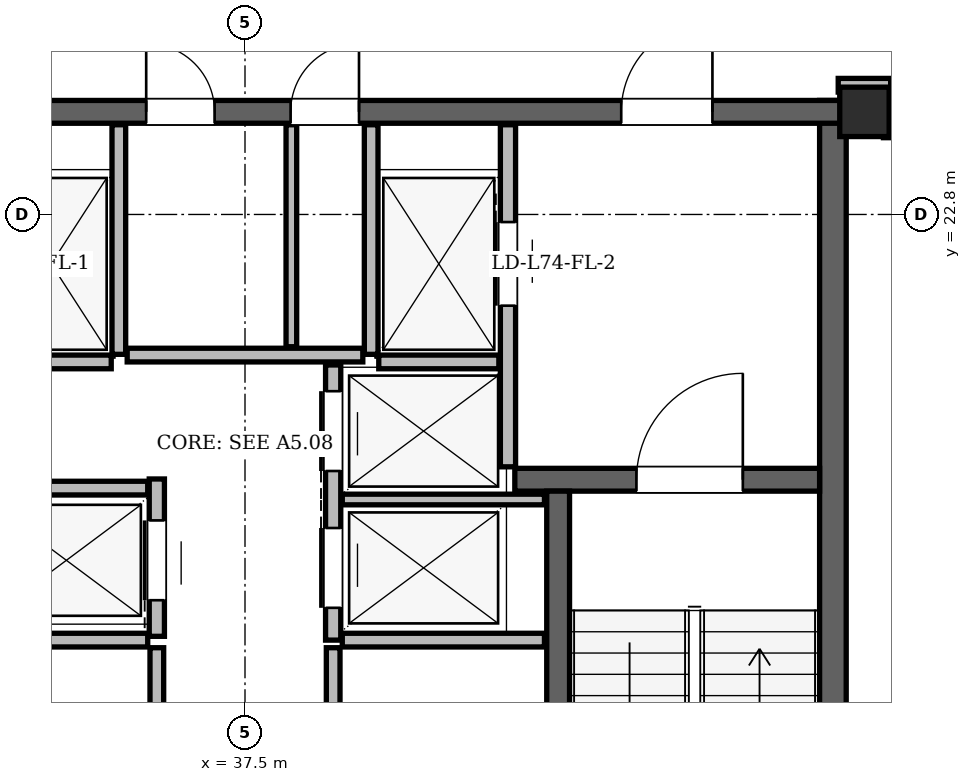
"""IFC4 building model, lengths in metres.
Left out: names, types, materials, properties, quantities, classifications, styles, units other than length and angle.
Written with IfcOpenShell. Run it as: python <this file> out.ifc"""

import sys

from ifc_helpers import new_model, si_unit, direction, frame, frame_2d, origin, origin_2d, place, context, subcontext, project, spatial, rectangle, hollow_rectangle, extrude, element, fill, save


model = new_model("IFC4")
c1 = context("Model", 3, precision=1e-05, world=origin(), true_north=direction((0.0, 1.0)))
c2 = subcontext(c1, "Body", "Model", "MODEL_VIEW")
j1 = project(units=[si_unit("LENGTHUNIT", "METRE"), si_unit("PLANEANGLEUNIT", "RADIAN")], contexts=[c1])
p1 = place(None, origin())
s1 = spatial("IfcSite", under=j1, at=p1, CompositionType="ELEMENT")
p2 = place(p1, origin())
s2 = spatial("IfcBuilding", under=s1, at=p2, CompositionType="ELEMENT")
p3 = place(p2, frame((0.0, 0.0, 281.1)))
s3 = spatial("IfcBuildingStorey", under=s2, at=p3, CompositionType="ELEMENT", Elevation=281.1)
p4 = place(p3, frame((45.65, 24.15, 0.0), z_axis=(0.0, 0.0, 1.0), x_axis=(1.0, 0.0, 0.0)))
e1 = element("IfcColumn", 1, at=p4, inside=s3, PredefinedType="COLUMN", context=c2, shape_type="SweptSolid", body=[
    extrude(hollow_rectangle(XDim=0.65, YDim=0.65, WallThickness=0.05, at=origin_2d()), origin(), (0.0, 0.0, 1.0), 3.9),
])
p5 = place(p3, frame((45.235, 11.0, 0.0), z_axis=(0.0, 0.0, 1.0), x_axis=(0.0, 1.0, 0.0)))
e2 = element("IfcWall", 2, at=p5, inside=s3, PredefinedType="SHEAR", context=c2, shape_type="SweptSolid", body=[
    extrude(rectangle(XDim=13.3, YDim=0.35, at=frame_2d((6.65, 0.0))), origin(), (0.0, 0.0, 1.0), 3.68),
])
p6 = place(p3, frame((29.65, 24.15, 0.0), z_axis=(0.0, 0.0, 1.0), x_axis=(1.0, 0.0, 0.0)))
e3 = element("IfcWall", 3, at=p6, inside=s3, PredefinedType="SHEAR", context=c2, shape_type="SweptSolid", body=[
    extrude(rectangle(XDim=15.7, YDim=0.3, at=frame_2d((7.85, 0.0))), origin(), (0.0, 0.0, 1.0), 3.68),
])
p7 = place(p6, frame((1.7, 0.0, 0.0)))
e4 = element("IfcOpeningElement", 4, at=p7, cuts=e3, PredefinedType="OPENING", context=c2, shape_type="SweptSolid", body=[
    extrude(rectangle(XDim=1.2, YDim=2.2, at=frame_2d((0.6, 1.1))), frame((0.0, 0.15, 0.0), z_axis=(0.0, -1.0, 0.0), x_axis=(1.0, 0.0, 0.0)), (0.0, 0.0, 1.0), 0.3),
])
p8 = place(p6, frame((12.8, 0.0, 0.0)))
e5 = element("IfcOpeningElement", 5, at=p8, cuts=e3, PredefinedType="OPENING", context=c2, shape_type="SweptSolid", body=[
    extrude(rectangle(XDim=1.2, YDim=2.2, at=frame_2d((0.6, 1.1))), frame((0.0, 0.15, 0.0), z_axis=(0.0, -1.0, 0.0), x_axis=(1.0, 0.0, 0.0)), (0.0, 0.0, 1.0), 0.3),
])
p9 = place(p6, frame((6.55, 0.0, 0.0)))
e6 = element("IfcOpeningElement", 6, at=p9, cuts=e3, PredefinedType="OPENING", context=c2, shape_type="SweptSolid", body=[
    extrude(rectangle(XDim=0.9, YDim=2.05, at=frame_2d((0.45, 1.025))), frame((0.0, 0.15, 0.0), z_axis=(0.0, -1.0, 0.0), x_axis=(1.0, 0.0, 0.0)), (0.0, 0.0, 1.0), 0.3),
])
p10 = place(p6, frame((8.45, 0.0, 0.0)))
e7 = element("IfcOpeningElement", 7, at=p10, cuts=e3, PredefinedType="OPENING", context=c2, shape_type="SweptSolid", body=[
    extrude(rectangle(XDim=0.9, YDim=2.05, at=frame_2d((0.45, 1.025))), frame((0.0, 0.15, 0.0), z_axis=(0.0, -1.0, 0.0), x_axis=(1.0, 0.0, 0.0)), (0.0, 0.0, 1.0), 0.3),
])
p11 = place(p3, frame((41.05, 19.31, 0.0), z_axis=(0.0, 0.0, 1.0), x_axis=(1.0, 0.0, 0.0)))
e8 = element("IfcWall", 8, at=p11, inside=s3, PredefinedType="SHEAR", context=c2, shape_type="SweptSolid", body=[
    extrude(rectangle(XDim=4.01, YDim=0.3, at=frame_2d((2.005, 0.0))), origin(), (0.0, 0.0, 1.0), 3.68),
])
p12 = place(p11, frame((1.6, 0.0, 0.0)))
e9 = element("IfcOpeningElement", 9, at=p12, cuts=e8, PredefinedType="OPENING", context=c2, shape_type="SweptSolid", body=[
    extrude(rectangle(XDim=1.4, YDim=2.2, at=frame_2d((0.7, 1.1))), frame((0.0, 0.15, 0.0), z_axis=(0.0, -1.0, 0.0), x_axis=(1.0, 0.0, 0.0)), (0.0, 0.0, 1.0), 0.3),
])
p13 = place(p3, frame((41.62, 11.54, 0.0), z_axis=(0.0, 0.0, 1.0), x_axis=(0.0, 1.0, 0.0)))
e10 = element("IfcWall", 10, at=p13, inside=s3, PredefinedType="SHEAR", context=c2, shape_type="SweptSolid", body=[
    extrude(rectangle(XDim=7.62, YDim=0.3, at=frame_2d((3.81, 0.0))), origin(), (0.0, 0.0, 1.0), 3.68),
])
p14 = place(p3, frame((58.454, 10.584, 0.0), z_axis=(0.0, 0.0, 1.0), x_axis=(-0.500002460556, 0.866023983177, 0.0)))
e11 = element("IfcWall", 11, at=p14, inside=s3, PredefinedType="SOLIDWALL", context=c2, shape_type="SweptSolid", body=[
    extrude(rectangle(XDim=37.435, YDim=0.29, at=frame_2d((18.718, 0.0))), origin(), (0.0, 0.0, 1.0), 3.058),
])
p15 = place(p14, frame((3.639, 0.0, 0.0)))
e12 = element("IfcOpeningElement", 12, at=p15, cuts=e11, PredefinedType="OPENING", context=c2, shape_type="SweptSolid", body=[
    extrude(rectangle(XDim=1.5, YDim=2.2, at=frame_2d((0.75, 1.1))), frame((0.0, 0.145, 0.0), z_axis=(0.0, -1.0, 0.0), x_axis=(1.0, 0.0, 0.0)), (0.0, 0.0, 1.0), 0.29),
])
p16 = place(p14, frame((27.901, 0.0, 0.0)))
e13 = element("IfcOpeningElement", 13, at=p16, cuts=e11, PredefinedType="OPENING", context=c2, shape_type="SweptSolid", body=[
    extrude(rectangle(XDim=1.5, YDim=2.2, at=frame_2d((0.75, 1.1))), frame((0.0, 0.145, 0.0), z_axis=(0.0, -1.0, 0.0), x_axis=(1.0, 0.0, 0.0)), (0.0, 0.0, 1.0), 0.29),
])
p17 = place(p14, frame((0.782, 0.0, 0.85)))
e14 = element("IfcOpeningElement", 14, at=p17, cuts=e11, PredefinedType="OPENING", context=c2, shape_type="SweptSolid", body=[
    extrude(rectangle(XDim=1.2, YDim=1.48, at=frame_2d((0.6, 0.74))), frame((0.0, 0.145, 0.0), z_axis=(0.0, -1.0, 0.0), x_axis=(1.0, 0.0, 0.0)), (0.0, 0.0, 1.0), 0.29),
])
p18 = place(p14, frame((7.149, 0.0, 0.85)))
e15 = element("IfcOpeningElement", 15, at=p18, cuts=e11, PredefinedType="OPENING", context=c2, shape_type="SweptSolid", body=[
    extrude(rectangle(XDim=2.4, YDim=1.9, at=frame_2d((1.2, 0.95))), frame((0.0, 0.145, 0.0), z_axis=(0.0, -1.0, 0.0), x_axis=(1.0, 0.0, 0.0)), (0.0, 0.0, 1.0), 0.29),
])
p19 = place(p14, frame((35.38, 0.0, 0.85)))
e16 = element("IfcOpeningElement", 16, at=p19, cuts=e11, PredefinedType="OPENING", context=c2, shape_type="SweptSolid", body=[
    extrude(rectangle(XDim=1.2, YDim=1.48, at=frame_2d((0.6, 0.74))), frame((0.0, 0.145, 0.0), z_axis=(0.0, -1.0, 0.0), x_axis=(1.0, 0.0, 0.0)), (0.0, 0.0, 1.0), 0.29),
])
p20 = place(p14, frame((16.994, 0.0, 0.85)))
e17 = element("IfcOpeningElement", 17, at=p20, cuts=e11, PredefinedType="OPENING", context=c2, shape_type="SweptSolid", body=[
    extrude(rectangle(XDim=1.2, YDim=1.48, at=frame_2d((0.6, 0.74))), frame((0.0, 0.145, 0.0), z_axis=(0.0, -1.0, 0.0), x_axis=(1.0, 0.0, 0.0)), (0.0, 0.0, 1.0), 0.29),
])
p21 = place(p14, frame((19.423, 0.0, 0.85)))
e18 = element("IfcOpeningElement", 18, at=p21, cuts=e11, PredefinedType="OPENING", context=c2, shape_type="SweptSolid", body=[
    extrude(rectangle(XDim=1.8, YDim=1.75, at=frame_2d((0.9, 0.875))), frame((0.0, 0.145, 0.0), z_axis=(0.0, -1.0, 0.0), x_axis=(1.0, 0.0, 0.0)), (0.0, 0.0, 1.0), 0.29),
])
p22 = place(p14, frame((22.626, 0.0, 0.85)))
e19 = element("IfcOpeningElement", 19, at=p22, cuts=e11, PredefinedType="OPENING", context=c2, shape_type="SweptSolid", body=[
    extrude(rectangle(XDim=2.2, YDim=1.85, at=frame_2d((1.1, 0.925))), frame((0.0, 0.145, 0.0), z_axis=(0.0, -1.0, 0.0), x_axis=(1.0, 0.0, 0.0)), (0.0, 0.0, 1.0), 0.29),
])
p23 = place(p14, frame((14.598, 0.0, 0.85)))
e20 = element("IfcOpeningElement", 20, at=p23, cuts=e11, PredefinedType="OPENING", context=c2, shape_type="SweptSolid", body=[
    extrude(rectangle(XDim=1.2, YDim=1.48, at=frame_2d((0.6, 0.74))), frame((0.0, 0.145, 0.0), z_axis=(0.0, -1.0, 0.0), x_axis=(1.0, 0.0, 0.0)), (0.0, 0.0, 1.0), 0.29),
])
p24 = place(p3, frame((35.264, 43.004, 0.0), z_axis=(0.0, 0.0, 1.0), x_axis=(-0.500002460556, -0.866023983177, 0.0)))
e21 = element("IfcWall", 21, at=p24, inside=s3, PredefinedType="SOLIDWALL", context=c2, shape_type="SweptSolid", body=[
    extrude(rectangle(XDim=37.435, YDim=0.29, at=frame_2d((18.718, 0.0))), origin(), (0.0, 0.0, 1.0), 3.058),
])
p25 = place(p24, frame((3.639, 0.0, 0.0)))
e22 = element("IfcOpeningElement", 22, at=p25, cuts=e21, PredefinedType="OPENING", context=c2, shape_type="SweptSolid", body=[
    extrude(rectangle(XDim=1.5, YDim=2.2, at=frame_2d((0.75, 1.1))), frame((0.0, 0.145, 0.0), z_axis=(0.0, -1.0, 0.0), x_axis=(1.0, 0.0, 0.0)), (0.0, 0.0, 1.0), 0.29),
])
p26 = place(p24, frame((27.481, 0.0, 0.0)))
e23 = element("IfcOpeningElement", 23, at=p26, cuts=e21, PredefinedType="OPENING", context=c2, shape_type="SweptSolid", body=[
    extrude(rectangle(XDim=1.5, YDim=2.2, at=frame_2d((0.75, 1.1))), frame((0.0, 0.145, 0.0), z_axis=(0.0, -1.0, 0.0), x_axis=(1.0, 0.0, 0.0)), (0.0, 0.0, 1.0), 0.29),
])
p27 = place(p24, frame((35.251, 0.0, 0.85)))
e24 = element("IfcOpeningElement", 24, at=p27, cuts=e21, PredefinedType="OPENING", context=c2, shape_type="SweptSolid", body=[
    extrude(rectangle(XDim=1.2, YDim=1.48, at=frame_2d((0.6, 0.74))), frame((0.0, 0.145, 0.0), z_axis=(0.0, -1.0, 0.0), x_axis=(1.0, 0.0, 0.0)), (0.0, 0.0, 1.0), 0.29),
])
p28 = place(p24, frame((29.441, 0.0, 0.85)))
e25 = element("IfcOpeningElement", 25, at=p28, cuts=e21, PredefinedType="OPENING", context=c2, shape_type="SweptSolid", body=[
    extrude(rectangle(XDim=1.2, YDim=1.48, at=frame_2d((0.6, 0.74))), frame((0.0, 0.145, 0.0), z_axis=(0.0, -1.0, 0.0), x_axis=(1.0, 0.0, 0.0)), (0.0, 0.0, 1.0), 0.29),
])
p29 = place(p24, frame((32.709, 0.0, 0.85)))
e26 = element("IfcOpeningElement", 26, at=p29, cuts=e21, PredefinedType="OPENING", context=c2, shape_type="SweptSolid", body=[
    extrude(rectangle(XDim=1.2, YDim=1.48, at=frame_2d((0.6, 0.74))), frame((0.0, 0.145, 0.0), z_axis=(0.0, -1.0, 0.0), x_axis=(1.0, 0.0, 0.0)), (0.0, 0.0, 1.0), 0.29),
])
p30 = place(p24, frame((20.345, 0.0, 0.85)))
e27 = element("IfcOpeningElement", 27, at=p30, cuts=e21, PredefinedType="OPENING", context=c2, shape_type="SweptSolid", body=[
    extrude(rectangle(XDim=1.2, YDim=1.48, at=frame_2d((0.6, 0.74))), frame((0.0, 0.145, 0.0), z_axis=(0.0, -1.0, 0.0), x_axis=(1.0, 0.0, 0.0)), (0.0, 0.0, 1.0), 0.29),
])
p31 = place(p24, frame((22.614, 0.0, 0.85)))
e28 = element("IfcOpeningElement", 28, at=p31, cuts=e21, PredefinedType="OPENING", context=c2, shape_type="SweptSolid", body=[
    extrude(rectangle(XDim=1.2, YDim=1.48, at=frame_2d((0.6, 0.74))), frame((0.0, 0.145, 0.0), z_axis=(0.0, -1.0, 0.0), x_axis=(1.0, 0.0, 0.0)), (0.0, 0.0, 1.0), 0.29),
])
p32 = place(p24, frame((1.862, 0.0, 0.85)))
e29 = element("IfcOpeningElement", 29, at=p32, cuts=e21, PredefinedType="OPENING", context=c2, shape_type="SweptSolid", body=[
    extrude(rectangle(XDim=1.2, YDim=1.48, at=frame_2d((0.6, 0.74))), frame((0.0, 0.145, 0.0), z_axis=(0.0, -1.0, 0.0), x_axis=(1.0, 0.0, 0.0)), (0.0, 0.0, 1.0), 0.29),
])
p33 = place(p24, frame((8.825, 0.0, 0.85)))
e30 = element("IfcOpeningElement", 30, at=p33, cuts=e21, PredefinedType="OPENING", context=c2, shape_type="SweptSolid", body=[
    extrude(rectangle(XDim=1.2, YDim=1.48, at=frame_2d((0.6, 0.74))), frame((0.0, 0.145, 0.0), z_axis=(0.0, -1.0, 0.0), x_axis=(1.0, 0.0, 0.0)), (0.0, 0.0, 1.0), 0.29),
])
p34 = place(p3, frame((35.84, 20.96, 0.0), z_axis=(0.0, 0.0, 1.0), x_axis=(0.0, 1.0, 0.0)))
e31 = element("IfcWall", 31, at=p34, inside=s3, PredefinedType="PARTITIONING", context=c2, shape_type="SweptSolid", body=[
    extrude(rectangle(XDim=3.02, YDim=0.18, at=frame_2d((1.51, 0.0))), origin(), (0.0, 0.0, 1.0), 3.68),
])
p35 = place(p3, frame((34.16, 20.86, 0.0), z_axis=(0.0, 0.0, 1.0), x_axis=(1.0, 0.0, 0.0)))
e32 = element("IfcWall", 32, at=p35, inside=s3, PredefinedType="PARTITIONING", context=c2, shape_type="SweptSolid", body=[
    extrude(rectangle(XDim=1.58, YDim=0.18, at=frame_2d((0.79, 0.0))), origin(), (0.0, 0.0, 1.0), 3.68),
])
p36 = place(p3, frame((40.96, 19.48, 0.0), z_axis=(0.0, 0.0, 1.0), x_axis=(0.0, 1.0, 0.0)))
e33 = element("IfcWall", 33, at=p36, inside=s3, PredefinedType="PARTITIONING", context=c2, shape_type="SweptSolid", body=[
    extrude(rectangle(XDim=4.5, YDim=0.2, at=frame_2d((2.25, 0.0))), origin(), (0.0, 0.0, 1.0), 3.68),
])
p37 = place(p36, frame((2.12, 0.0, 0.0)))
e34 = element("IfcOpeningElement", 34, at=p37, cuts=e33, PredefinedType="OPENING", context=c2, shape_type="SweptSolid", body=[
    extrude(rectangle(XDim=1.1, YDim=2.2, at=frame_2d((0.55, 1.1))), frame((0.0, 0.1, 0.0), z_axis=(0.0, -1.0, 0.0), x_axis=(1.0, 0.0, 0.0)), (0.0, 0.0, 1.0), 0.2),
])
p38 = place(p3, frame((39.16, 20.96, 0.0), z_axis=(0.0, 0.0, 1.0), x_axis=(0.0, 1.0, 0.0)))
e35 = element("IfcWall", 35, at=p38, inside=s3, PredefinedType="PARTITIONING", context=c2, shape_type="SweptSolid", body=[
    extrude(rectangle(XDim=3.02, YDim=0.18, at=frame_2d((1.51, 0.0))), origin(), (0.0, 0.0, 1.0), 3.68),
])
p39 = place(p3, frame((39.26, 20.86, 0.0), z_axis=(0.0, 0.0, 1.0), x_axis=(1.0, 0.0, 0.0)))
e36 = element("IfcWall", 36, at=p39, inside=s3, PredefinedType="PARTITIONING", context=c2, shape_type="SweptSolid", body=[
    extrude(rectangle(XDim=1.58, YDim=0.18, at=frame_2d((0.79, 0.0))), origin(), (0.0, 0.0, 1.0), 3.68),
])
p40 = place(p3, frame((36.34, 17.25, 0.0), z_axis=(0.0, 0.0, 1.0), x_axis=(0.0, 1.0, 0.0)))
e37 = element("IfcWall", 37, at=p40, inside=s3, PredefinedType="PARTITIONING", context=c2, shape_type="SweptSolid", body=[
    extrude(rectangle(XDim=2.07, YDim=0.2, at=frame_2d((1.035, 0.0))), origin(), (0.0, 0.0, 1.0), 3.68),
])
p41 = place(p40, frame((0.475, 0.0, 0.0)))
e38 = element("IfcOpeningElement", 38, at=p41, cuts=e37, PredefinedType="OPENING", context=c2, shape_type="SweptSolid", body=[
    extrude(rectangle(XDim=1.05, YDim=2.15, at=frame_2d((0.525, 1.075))), frame((0.0, 0.1, 0.0), z_axis=(0.0, -1.0, 0.0), x_axis=(1.0, 0.0, 0.0)), (0.0, 0.0, 1.0), 0.2),
])
p42 = place(p3, frame((33.95, 19.2, 0.0), z_axis=(0.0, 0.0, 1.0), x_axis=(1.0, 0.0, 0.0)))
e39 = element("IfcWall", 39, at=p42, inside=s3, PredefinedType="PARTITIONING", context=c2, shape_type="SweptSolid", body=[
    extrude(rectangle(XDim=2.27, YDim=0.18, at=frame_2d((1.135, 0.0))), origin(), (0.0, 0.0, 1.0), 3.68),
])
p43 = place(p3, frame((33.56, 17.2, 0.0), z_axis=(0.0, 0.0, 1.0), x_axis=(1.0, 0.0, 0.0)))
e40 = element("IfcWall", 40, at=p43, inside=s3, PredefinedType="PARTITIONING", context=c2, shape_type="SweptSolid", body=[
    extrude(rectangle(XDim=2.66, YDim=0.18, at=frame_2d((1.33, 0.0))), origin(), (0.0, 0.0, 1.0), 3.68),
])
p44 = place(p3, frame((36.34, 11.55, 0.0), z_axis=(0.0, 0.0, 1.0), x_axis=(0.0, 1.0, 0.0)))
e41 = element("IfcWall", 41, at=p44, inside=s3, PredefinedType="PARTITIONING", context=c2, shape_type="SweptSolid", body=[
    extrude(rectangle(XDim=5.55, YDim=0.18, at=frame_2d((2.775, 0.0))), origin(), (0.0, 0.0, 1.0), 3.68),
])
p45 = place(p44, frame((2.85, 0.0, 0.0)))
e42 = element("IfcOpeningElement", 42, at=p45, cuts=e41, PredefinedType="OPENING", context=c2, shape_type="SweptSolid", body=[
    extrude(rectangle(XDim=0.95, YDim=2.1, at=frame_2d((0.475, 1.05))), frame((0.0, 0.09, 0.0), z_axis=(0.0, -1.0, 0.0), x_axis=(1.0, 0.0, 0.0)), (0.0, 0.0, 1.0), 0.18),
])
p46 = place(p3, frame((38.66, 17.2, 0.0), z_axis=(0.0, 0.0, 1.0), x_axis=(0.0, 1.0, 0.0)))
e43 = element("IfcWall", 43, at=p46, inside=s3, PredefinedType="PARTITIONING", context=c2, shape_type="SweptSolid", body=[
    extrude(rectangle(XDim=3.62, YDim=0.2, at=frame_2d((1.81, 0.0))), origin(), (0.0, 0.0, 1.0), 3.68),
])
p47 = place(p46, frame((0.425, 0.0, 0.0)))
e44 = element("IfcOpeningElement", 44, at=p47, cuts=e43, PredefinedType="OPENING", context=c2, shape_type="SweptSolid", body=[
    extrude(rectangle(XDim=1.05, YDim=2.15, at=frame_2d((0.525, 1.075))), frame((0.0, 0.1, 0.0), z_axis=(0.0, -1.0, 0.0), x_axis=(1.0, 0.0, 0.0)), (0.0, 0.0, 1.0), 0.2),
])
p48 = place(p46, frame((2.225, 0.0, 0.0)))
e45 = element("IfcOpeningElement", 45, at=p48, cuts=e43, PredefinedType="OPENING", context=c2, shape_type="SweptSolid", body=[
    extrude(rectangle(XDim=1.05, YDim=2.15, at=frame_2d((0.525, 1.075))), frame((0.0, 0.1, 0.0), z_axis=(0.0, -1.0, 0.0), x_axis=(1.0, 0.0, 0.0)), (0.0, 0.0, 1.0), 0.2),
])
p49 = place(p3, frame((38.78, 17.2, 0.0), z_axis=(0.0, 0.0, 1.0), x_axis=(1.0, 0.0, 0.0)))
e46 = element("IfcWall", 46, at=p49, inside=s3, PredefinedType="PARTITIONING", context=c2, shape_type="SweptSolid", body=[
    extrude(rectangle(XDim=2.66, YDim=0.18, at=frame_2d((1.33, 0.0))), origin(), (0.0, 0.0, 1.0), 3.68),
])
p50 = place(p3, frame((38.78, 19.05, 0.0), z_axis=(0.0, 0.0, 1.0), x_axis=(1.0, 0.0, 0.0)))
e47 = element("IfcWall", 47, at=p50, inside=s3, PredefinedType="PARTITIONING", context=c2, shape_type="SweptSolid", body=[
    extrude(rectangle(XDim=2.66, YDim=0.14, at=frame_2d((1.33, 0.0))), origin(), (0.0, 0.0, 1.0), 3.68),
])
p51 = place(p3, frame((38.66, 11.55, 0.0), z_axis=(0.0, 0.0, 1.0), x_axis=(0.0, 1.0, 0.0)))
e48 = element("IfcWall", 48, at=p51, inside=s3, PredefinedType="PARTITIONING", context=c2, shape_type="SweptSolid", body=[
    extrude(rectangle(XDim=5.55, YDim=0.18, at=frame_2d((2.775, 0.0))), origin(), (0.0, 0.0, 1.0), 3.68),
])
p52 = place(p51, frame((3.15, 0.0, 0.0)))
e49 = element("IfcOpeningElement", 49, at=p52, cuts=e48, PredefinedType="OPENING", context=c2, shape_type="SweptSolid", body=[
    extrude(rectangle(XDim=0.95, YDim=2.1, at=frame_2d((0.475, 1.05))), frame((0.0, 0.09, 0.0), z_axis=(0.0, -1.0, 0.0), x_axis=(1.0, 0.0, 0.0)), (0.0, 0.0, 1.0), 0.18),
])
p53 = place(p3, frame((35.95, 20.95, 0.0), z_axis=(0.0, 0.0, 1.0), x_axis=(1.0, 0.0, 0.0)))
e50 = element("IfcWall", 50, at=p53, inside=s3, PredefinedType="PARTITIONING", context=c2, shape_type="SweptSolid", body=[
    extrude(rectangle(XDim=3.1, YDim=0.18, at=frame_2d((1.55, 0.0))), origin(), (0.0, 0.0, 1.0), 3.68),
])
p54 = place(p3, frame((38.11, 21.06, 0.0), z_axis=(0.0, 0.0, 1.0), x_axis=(0.0, 1.0, 0.0)))
e51 = element("IfcWall", 51, at=p54, inside=s3, PredefinedType="PARTITIONING", context=c2, shape_type="SweptSolid", body=[
    extrude(rectangle(XDim=2.92, YDim=0.14, at=frame_2d((1.46, 0.0))), origin(), (0.0, 0.0, 1.0), 3.68),
])
p55 = place(p3, frame((45.305, 24.5, 0.0), z_axis=(0.0, 0.0, 1.0), x_axis=(1.0, 0.0, 0.0)))
e52 = element("IfcWall", 52, at=p55, inside=s3, PredefinedType="PARTITIONING", context=c2, shape_type="SweptSolid", body=[
    extrude(rectangle(XDim=0.69, YDim=0.18, at=frame_2d((0.345, 0.0))), origin(), (0.0, 0.0, 1.0), 3.266),
])
p56 = place(p3, frame((45.99, 23.81, 0.0), z_axis=(0.0, 0.0, 1.0), x_axis=(0.0, 1.0, 0.0)))
e53 = element("IfcWall", 53, at=p56, inside=s3, PredefinedType="PARTITIONING", context=c2, shape_type="SweptSolid", body=[
    extrude(rectangle(XDim=0.51, YDim=0.18, at=frame_2d((0.255, 0.0))), origin(), (0.0, 0.0, 1.0), 3.68),
])
p57 = place(p37, origin())
e54 = element("IfcDoor", 54, at=p57, inside=s3, OperationType="SLIDING_TO_RIGHT", PredefinedType="DOOR", context=c2, shape_type="SweptSolid", body=[
    extrude(rectangle(XDim=1.1, YDim=2.2, at=frame_2d((0.55, 1.1))), frame((0.0, 0.025, 0.0), z_axis=(0.0, -1.0, 0.0), x_axis=(1.0, 0.0, 0.0)), (0.0, 0.0, 1.0), 0.05),
])
fill(e34, e54)
p58 = place(p41, origin())
e55 = element("IfcDoor", 55, at=p58, inside=s3, OperationType="SLIDING_TO_LEFT", PredefinedType="DOOR", context=c2, shape_type="SweptSolid", body=[
    extrude(rectangle(XDim=1.05, YDim=2.15, at=frame_2d((0.525, 1.075))), frame((0.0, 0.025, 0.0), z_axis=(0.0, -1.0, 0.0), x_axis=(1.0, 0.0, 0.0)), (0.0, 0.0, 1.0), 0.05),
])
fill(e38, e55)
p59 = place(p47, origin())
e56 = element("IfcDoor", 56, at=p59, inside=s3, OperationType="SLIDING_TO_RIGHT", PredefinedType="DOOR", context=c2, shape_type="SweptSolid", body=[
    extrude(rectangle(XDim=1.05, YDim=2.15, at=frame_2d((0.525, 1.075))), frame((0.0, 0.025, 0.0), z_axis=(0.0, -1.0, 0.0), x_axis=(1.0, 0.0, 0.0)), (0.0, 0.0, 1.0), 0.05),
])
fill(e44, e56)
p60 = place(p48, origin())
e57 = element("IfcDoor", 57, at=p60, inside=s3, OperationType="SLIDING_TO_LEFT", PredefinedType="DOOR", context=c2, shape_type="SweptSolid", body=[
    extrude(rectangle(XDim=1.05, YDim=2.15, at=frame_2d((0.525, 1.075))), frame((0.0, 0.025, 0.0), z_axis=(0.0, -1.0, 0.0), x_axis=(1.0, 0.0, 0.0)), (0.0, 0.0, 1.0), 0.05),
])
fill(e45, e57)
p61 = place(p12, origin())
e58 = element("IfcDoor", 58, at=p61, inside=s3, OperationType="SINGLE_SWING_RIGHT", PredefinedType="DOOR", context=c2, shape_type="SweptSolid", body=[
    extrude(rectangle(XDim=1.4, YDim=2.2, at=frame_2d((0.7, 1.1))), frame((0.0, 0.025, 0.0), z_axis=(0.0, -1.0, 0.0), x_axis=(1.0, 0.0, 0.0)), (0.0, 0.0, 1.0), 0.05),
])
fill(e9, e58)
p62 = place(p8, origin())
e59 = element("IfcDoor", 59, at=p62, inside=s3, OperationType="SINGLE_SWING_RIGHT", PredefinedType="DOOR", context=c2, shape_type="SweptSolid", body=[
    extrude(rectangle(XDim=1.2, YDim=2.2, at=frame_2d((0.6, 1.1))), frame((0.0, 0.025, 0.0), z_axis=(0.0, -1.0, 0.0), x_axis=(1.0, 0.0, 0.0)), (0.0, 0.0, 1.0), 0.05),
])
fill(e5, e59)
p63 = place(p9, origin())
e60 = element("IfcDoor", 60, at=p63, inside=s3, OperationType="SINGLE_SWING_LEFT", PredefinedType="DOOR", context=c2, shape_type="SweptSolid", body=[
    extrude(rectangle(XDim=0.9, YDim=2.05, at=frame_2d((0.45, 1.025))), frame((0.0, 0.025, 0.0), z_axis=(0.0, -1.0, 0.0), x_axis=(1.0, 0.0, 0.0)), (0.0, 0.0, 1.0), 0.05),
])
fill(e6, e60)
p64 = place(p10, origin())
e61 = element("IfcDoor", 61, at=p64, inside=s3, OperationType="SINGLE_SWING_RIGHT", PredefinedType="DOOR", context=c2, shape_type="SweptSolid", body=[
    extrude(rectangle(XDim=0.9, YDim=2.05, at=frame_2d((0.45, 1.025))), frame((0.0, 0.025, 0.0), z_axis=(0.0, -1.0, 0.0), x_axis=(1.0, 0.0, 0.0)), (0.0, 0.0, 1.0), 0.05),
])
fill(e7, e61)
save(model, sys.argv[1])
